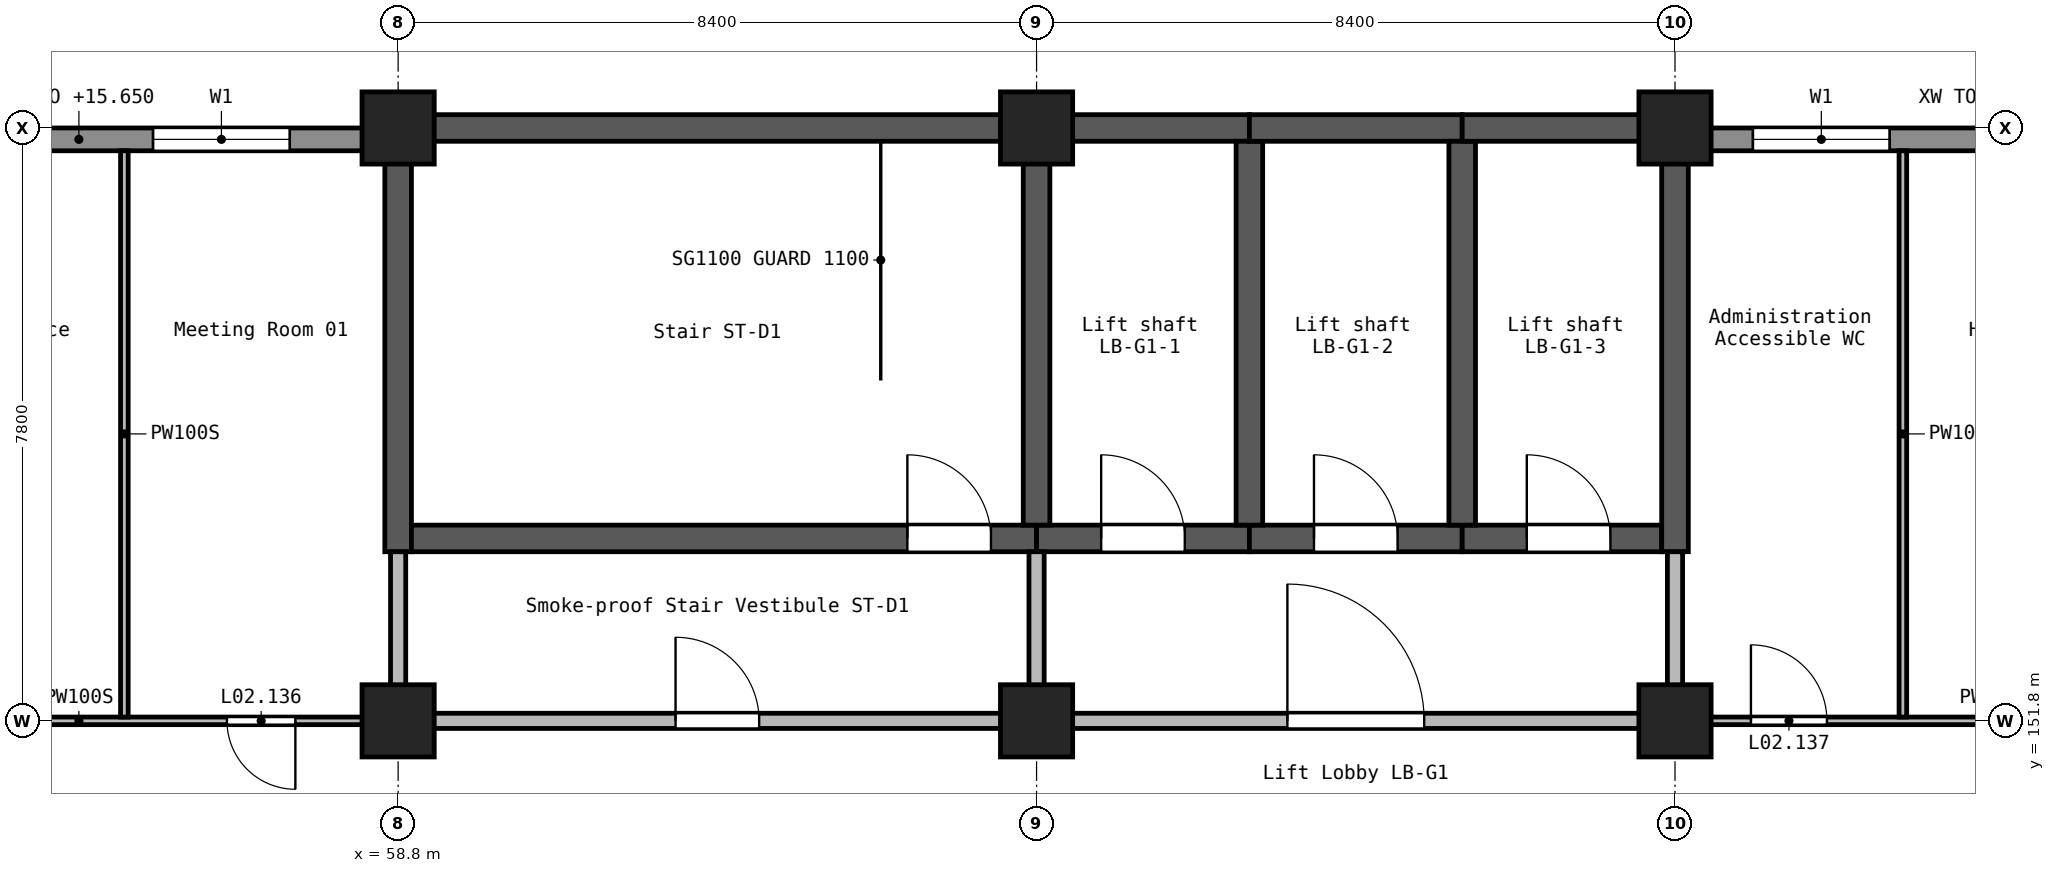
"""IFC4 building model, lengths in metres.
Left out: names, types, materials, properties, quantities, classifications, styles, units other than length and angle.
Written with IfcOpenShell. Run it as: python <this file> out.ifc"""

import sys

from ifc_helpers import new_model, si_unit, direction, frame, frame_2d, origin, origin_2d, place, context, subcontext, project, spatial, rectangle, extrude, element, fill, save


model = new_model("IFC4")
c1 = context("Model", 3, precision=1e-05, world=origin(), true_north=direction((0.0, 1.0)))
c2 = subcontext(c1, "Body", "Model", "MODEL_VIEW")
j1 = project(units=[si_unit("LENGTHUNIT", "METRE"), si_unit("PLANEANGLEUNIT", "RADIAN")], contexts=[c1])
p1 = place(None, origin())
s1 = spatial("IfcSite", under=j1, at=p1, CompositionType="ELEMENT")
p2 = place(p1, origin())
s2 = spatial("IfcBuilding", under=s1, at=p2, CompositionType="ELEMENT")
p3 = place(p2, frame((0.0, 0.0, 12.6)))
s3 = spatial("IfcBuildingStorey", under=s2, at=p3, CompositionType="ELEMENT", Elevation=12.6)
for number, where, z_axis, x_axis in (
    (1, (58.8, 151.8, 0.0), (0.0, 0.0, 1.0), (1.0, 0.0, 0.0)),
    (2, (58.8, 159.6, 0.0), (0.0, 0.0, 1.0), (1.0, 0.0, 0.0)),
    (3, (67.2, 151.8, 0.0), (0.0, 0.0, 1.0), (1.0, 0.0, 0.0)),
    (4, (67.2, 159.6, 0.0), (0.0, 0.0, 1.0), (1.0, 0.0, 0.0)),
    (5, (75.6, 151.8, 0.0), (0.0, 0.0, 1.0), (1.0, 0.0, 0.0)),
    (6, (75.6, 159.6, 0.0), (0.0, 0.0, 1.0), (1.0, 0.0, 0.0)),
):
    element("IfcColumn", number, at=place(p3, frame(where, z_axis=z_axis, x_axis=x_axis)), inside=s3, PredefinedType="COLUMN", context=c2, shape_type="SweptSolid", body=[
        extrude(rectangle(XDim=0.95, YDim=0.95, at=origin_2d()), origin(), (0.0, 0.0, 1.0), 4.2),
    ])
p4 = place(p3, frame((58.625, 159.6, 0.0), z_axis=(0.0, 0.0, 1.0), x_axis=(1.0, 0.0, 0.0)))
e7 = element("IfcWall", 7, at=p4, inside=s3, PredefinedType="SHEAR", context=c2, shape_type="SweptSolid", body=[
    extrude(rectangle(XDim=8.575, YDim=0.35, at=frame_2d((4.288, 0.0))), origin(), (0.0, 0.0, 1.0), 4.2),
])
p5 = place(p3, frame((58.8, 154.025, 0.0), z_axis=(0.0, 0.0, 1.0), x_axis=(0.0, 1.0, 0.0)))
e8 = element("IfcWall", 8, at=p5, inside=s3, PredefinedType="SHEAR", context=c2, shape_type="SweptSolid", body=[
    extrude(rectangle(XDim=5.4, YDim=0.35, at=frame_2d((2.7, 0.0))), origin(), (0.0, 0.0, 1.0), 4.2),
])
p6 = place(p3, frame((58.975, 154.2, 0.0), z_axis=(0.0, 0.0, 1.0), x_axis=(1.0, 0.0, 0.0)))
e9 = element("IfcWall", 9, at=p6, inside=s3, PredefinedType="SHEAR", context=c2, shape_type="SweptSolid", body=[
    extrude(rectangle(XDim=8.225, YDim=0.35, at=frame_2d((4.112, 0.0))), origin(), (0.0, 0.0, 1.0), 4.2),
])
p7 = place(p6, frame((6.525, 0.0, 0.0)))
e10 = element("IfcOpeningElement", 10, at=p7, cuts=e9, PredefinedType="OPENING", context=c2, shape_type="SweptSolid", body=[
    extrude(rectangle(XDim=1.1, YDim=2.1, at=frame_2d((0.55, 1.05))), frame((0.0, 0.185, 0.0), z_axis=(0.0, -1.0, 0.0), x_axis=(1.0, 0.0, 0.0)), (0.0, 0.0, 1.0), 0.37),
])
p8 = place(p3, frame((67.2, 154.2, 0.0), z_axis=(0.0, 0.0, 1.0), x_axis=(1.0, 0.0, 0.0)))
e11 = element("IfcWall", 11, at=p8, inside=s3, PredefinedType="SHEAR", context=c2, shape_type="SweptSolid", body=[
    extrude(rectangle(XDim=2.8, YDim=0.35, at=frame_2d((1.4, 0.0))), origin(), (0.0, 0.0, 1.0), 4.2),
])
p9 = place(p8, frame((0.85, 0.0, 0.0)))
e12 = element("IfcOpeningElement", 12, at=p9, cuts=e11, PredefinedType="OPENING", context=c2, shape_type="SweptSolid", body=[
    extrude(rectangle(XDim=1.1, YDim=2.1, at=frame_2d((0.55, 1.05))), frame((0.0, 0.185, 0.0), z_axis=(0.0, -1.0, 0.0), x_axis=(1.0, 0.0, 0.0)), (0.0, 0.0, 1.0), 0.37),
])
p10 = place(p3, frame((67.2, 154.375, 0.0), z_axis=(0.0, 0.0, 1.0), x_axis=(0.0, 1.0, 0.0)))
e13 = element("IfcWall", 13, at=p10, inside=s3, PredefinedType="SHEAR", context=c2, shape_type="SweptSolid", body=[
    extrude(rectangle(XDim=5.05, YDim=0.35, at=frame_2d((2.525, 0.0))), origin(), (0.0, 0.0, 1.0), 4.2),
])
p11 = place(p3, frame((67.2, 159.6, 0.0), z_axis=(0.0, 0.0, 1.0), x_axis=(1.0, 0.0, 0.0)))
e14 = element("IfcWall", 14, at=p11, inside=s3, PredefinedType="SHEAR", context=c2, shape_type="SweptSolid", body=[
    extrude(rectangle(XDim=2.8, YDim=0.35, at=frame_2d((1.4, 0.0))), origin(), (0.0, 0.0, 1.0), 4.2),
])
p12 = place(p3, frame((70.0, 154.2, 0.0), z_axis=(0.0, 0.0, 1.0), x_axis=(1.0, 0.0, 0.0)))
e15 = element("IfcWall", 15, at=p12, inside=s3, PredefinedType="SHEAR", context=c2, shape_type="SweptSolid", body=[
    extrude(rectangle(XDim=2.8, YDim=0.35, at=frame_2d((1.4, 0.0))), origin(), (0.0, 0.0, 1.0), 4.2),
])
p13 = place(p12, frame((0.85, 0.0, 0.0)))
e16 = element("IfcOpeningElement", 16, at=p13, cuts=e15, PredefinedType="OPENING", context=c2, shape_type="SweptSolid", body=[
    extrude(rectangle(XDim=1.1, YDim=2.1, at=frame_2d((0.55, 1.05))), frame((0.0, 0.185, 0.0), z_axis=(0.0, -1.0, 0.0), x_axis=(1.0, 0.0, 0.0)), (0.0, 0.0, 1.0), 0.37),
])
p14 = place(p3, frame((70.0, 154.375, 0.0), z_axis=(0.0, 0.0, 1.0), x_axis=(0.0, 1.0, 0.0)))
e17 = element("IfcWall", 17, at=p14, inside=s3, PredefinedType="SHEAR", context=c2, shape_type="SweptSolid", body=[
    extrude(rectangle(XDim=5.05, YDim=0.35, at=frame_2d((2.525, 0.0))), origin(), (0.0, 0.0, 1.0), 4.2),
])
p15 = place(p3, frame((70.0, 159.6, 0.0), z_axis=(0.0, 0.0, 1.0), x_axis=(1.0, 0.0, 0.0)))
e18 = element("IfcWall", 18, at=p15, inside=s3, PredefinedType="SHEAR", context=c2, shape_type="SweptSolid", body=[
    extrude(rectangle(XDim=2.8, YDim=0.35, at=frame_2d((1.4, 0.0))), origin(), (0.0, 0.0, 1.0), 4.2),
])
p16 = place(p3, frame((72.8, 154.2, 0.0), z_axis=(0.0, 0.0, 1.0), x_axis=(1.0, 0.0, 0.0)))
e19 = element("IfcWall", 19, at=p16, inside=s3, PredefinedType="SHEAR", context=c2, shape_type="SweptSolid", body=[
    extrude(rectangle(XDim=2.625, YDim=0.35, at=frame_2d((1.312, 0.0))), origin(), (0.0, 0.0, 1.0), 4.2),
])
p17 = place(p16, frame((0.85, 0.0, 0.0)))
e20 = element("IfcOpeningElement", 20, at=p17, cuts=e19, PredefinedType="OPENING", context=c2, shape_type="SweptSolid", body=[
    extrude(rectangle(XDim=1.1, YDim=2.1, at=frame_2d((0.55, 1.05))), frame((0.0, 0.185, 0.0), z_axis=(0.0, -1.0, 0.0), x_axis=(1.0, 0.0, 0.0)), (0.0, 0.0, 1.0), 0.37),
])
p18 = place(p3, frame((72.8, 154.375, 0.0), z_axis=(0.0, 0.0, 1.0), x_axis=(0.0, 1.0, 0.0)))
e21 = element("IfcWall", 21, at=p18, inside=s3, PredefinedType="SHEAR", context=c2, shape_type="SweptSolid", body=[
    extrude(rectangle(XDim=5.05, YDim=0.35, at=frame_2d((2.525, 0.0))), origin(), (0.0, 0.0, 1.0), 4.2),
])
p19 = place(p3, frame((72.8, 159.6, 0.0), z_axis=(0.0, 0.0, 1.0), x_axis=(1.0, 0.0, 0.0)))
e22 = element("IfcWall", 22, at=p19, inside=s3, PredefinedType="SHEAR", context=c2, shape_type="SweptSolid", body=[
    extrude(rectangle(XDim=2.625, YDim=0.35, at=frame_2d((1.312, 0.0))), origin(), (0.0, 0.0, 1.0), 4.2),
])
p20 = place(p3, frame((75.6, 154.025, 0.0), z_axis=(0.0, 0.0, 1.0), x_axis=(0.0, 1.0, 0.0)))
e23 = element("IfcWall", 23, at=p20, inside=s3, PredefinedType="SHEAR", context=c2, shape_type="SweptSolid", body=[
    extrude(rectangle(XDim=5.75, YDim=0.35, at=frame_2d((2.875, 0.0))), origin(), (0.0, 0.0, 1.0), 4.2),
])
p21 = place(p3, frame((83.55, 159.45, 0.0), z_axis=(0.0, 0.0, 1.0), x_axis=(-1.0, 0.0, 0.0)))
e24 = element("IfcWall", 24, at=p21, inside=s3, PredefinedType="STANDARD", context=c2, shape_type="SweptSolid", body=[
    extrude(rectangle(XDim=7.5, YDim=0.3, at=frame_2d((3.75, 0.0))), origin(), (0.0, 0.0, 1.0), 3.05),
])
p22 = place(p21, frame((0.975, 0.0, 0.9)))
e25 = element("IfcOpeningElement", 25, at=p22, cuts=e24, PredefinedType="OPENING", context=c2, shape_type="SweptSolid", body=[
    extrude(rectangle(XDim=1.8, YDim=1.5, at=frame_2d((0.9, 0.75))), frame((0.0, 0.16, 0.0), z_axis=(0.0, -1.0, 0.0), x_axis=(1.0, 0.0, 0.0)), (0.0, 0.0, 1.0), 0.32),
])
p23 = place(p21, frame((5.125, 0.0, 0.9)))
e26 = element("IfcOpeningElement", 26, at=p23, cuts=e24, PredefinedType="OPENING", context=c2, shape_type="SweptSolid", body=[
    extrude(rectangle(XDim=1.8, YDim=1.5, at=frame_2d((0.9, 0.75))), frame((0.0, 0.16, 0.0), z_axis=(0.0, -1.0, 0.0), x_axis=(1.0, 0.0, 0.0)), (0.0, 0.0, 1.0), 0.32),
])
p24 = place(p3, frame((58.35, 159.45, 0.0), z_axis=(0.0, 0.0, 1.0), x_axis=(-1.0, 0.0, 0.0)))
e27 = element("IfcWall", 27, at=p24, inside=s3, PredefinedType="STANDARD", context=c2, shape_type="SweptSolid", body=[
    extrude(rectangle(XDim=7.5, YDim=0.3, at=frame_2d((3.75, 0.0))), origin(), (0.0, 0.0, 1.0), 3.05),
])
p25 = place(p24, frame((0.975, 0.0, 0.9)))
e28 = element("IfcOpeningElement", 28, at=p25, cuts=e27, PredefinedType="OPENING", context=c2, shape_type="SweptSolid", body=[
    extrude(rectangle(XDim=1.8, YDim=1.5, at=frame_2d((0.9, 0.75))), frame((0.0, 0.16, 0.0), z_axis=(0.0, -1.0, 0.0), x_axis=(1.0, 0.0, 0.0)), (0.0, 0.0, 1.0), 0.32),
])
p26 = place(p24, frame((4.725, 0.0, 0.9)))
e29 = element("IfcOpeningElement", 29, at=p26, cuts=e27, PredefinedType="OPENING", context=c2, shape_type="SweptSolid", body=[
    extrude(rectangle(XDim=1.8, YDim=1.5, at=frame_2d((0.9, 0.75))), frame((0.0, 0.16, 0.0), z_axis=(0.0, -1.0, 0.0), x_axis=(1.0, 0.0, 0.0)), (0.0, 0.0, 1.0), 0.32),
])
p27 = place(p3, frame((59.25, 151.8, 0.0), z_axis=(0.0, 0.0, 1.0), x_axis=(1.0, 0.0, 0.0)))
e30 = element("IfcWall", 30, at=p27, inside=s3, PredefinedType="SOLIDWALL", context=c2, shape_type="SweptSolid", body=[
    extrude(rectangle(XDim=7.5, YDim=0.2, at=frame_2d((3.75, 0.0))), origin(), (0.0, 0.0, 1.0), 3.85),
])
p28 = place(p27, frame((3.2, 0.0, 0.0)))
e31 = element("IfcOpeningElement", 31, at=p28, cuts=e30, PredefinedType="OPENING", context=c2, shape_type="SweptSolid", body=[
    extrude(rectangle(XDim=1.1, YDim=2.1, at=frame_2d((0.55, 1.05))), frame((0.0, 0.11, 0.0), z_axis=(0.0, -1.0, 0.0), x_axis=(1.0, 0.0, 0.0)), (0.0, 0.0, 1.0), 0.22),
])
p29 = place(p3, frame((67.65, 151.8, 0.0), z_axis=(0.0, 0.0, 1.0), x_axis=(1.0, 0.0, 0.0)))
e32 = element("IfcWall", 32, at=p29, inside=s3, PredefinedType="SOLIDWALL", context=c2, shape_type="SweptSolid", body=[
    extrude(rectangle(XDim=7.5, YDim=0.2, at=frame_2d((3.75, 0.0))), origin(), (0.0, 0.0, 1.0), 3.85),
])
p30 = place(p29, frame((2.85, 0.0, 0.0)))
e33 = element("IfcOpeningElement", 33, at=p30, cuts=e32, PredefinedType="OPENING", context=c2, shape_type="SweptSolid", body=[
    extrude(rectangle(XDim=1.8, YDim=2.1, at=frame_2d((0.9, 1.05))), frame((0.0, 0.11, 0.0), z_axis=(0.0, -1.0, 0.0), x_axis=(1.0, 0.0, 0.0)), (0.0, 0.0, 1.0), 0.22),
])
for number, where, z_axis, x_axis in (
    (34, (58.8, 152.25, 0.0), (0.0, 0.0, 1.0), (0.0, 1.0, 0.0)),
    (35, (67.2, 152.25, 0.0), (0.0, 0.0, 1.0), (0.0, 1.0, 0.0)),
    (36, (75.6, 152.25, 0.0), (0.0, 0.0, 1.0), (0.0, 1.0, 0.0)),
):
    element("IfcWall", number, at=place(p3, frame(where, z_axis=z_axis, x_axis=x_axis)), inside=s3, PredefinedType="SOLIDWALL", context=c2, shape_type="SweptSolid", body=[
        extrude(rectangle(XDim=1.775, YDim=0.2, at=frame_2d((0.887, 0.0))), origin(), (0.0, 0.0, 1.0), 3.85),
    ])
p31 = place(p3, frame((76.05, 151.8, 0.0), z_axis=(0.0, 0.0, 1.0), x_axis=(1.0, 0.0, 0.0)))
e37 = element("IfcWall", 37, at=p31, inside=s3, PredefinedType="PARTITIONING", context=c2, shape_type="SweptSolid", body=[
    extrude(rectangle(XDim=7.5, YDim=0.1, at=frame_2d((3.75, 0.0))), origin(), (0.0, 0.0, 1.0), 3.85),
])
p32 = place(p31, frame((0.549, 0.0, 0.0)))
e38 = element("IfcOpeningElement", 38, at=p32, cuts=e37, PredefinedType="OPENING", context=c2, shape_type="SweptSolid", body=[
    extrude(rectangle(XDim=1.0, YDim=2.1, at=frame_2d((0.5, 1.05))), frame((0.0, 0.06, 0.0), z_axis=(0.0, -1.0, 0.0), x_axis=(1.0, 0.0, 0.0)), (0.0, 0.0, 1.0), 0.12),
])
p33 = place(p31, frame((4.799, 0.0, 0.0)))
e39 = element("IfcOpeningElement", 39, at=p33, cuts=e37, PredefinedType="OPENING", context=c2, shape_type="SweptSolid", body=[
    extrude(rectangle(XDim=0.9, YDim=2.1, at=frame_2d((0.45, 1.05))), frame((0.0, 0.06, 0.0), z_axis=(0.0, -1.0, 0.0), x_axis=(1.0, 0.0, 0.0)), (0.0, 0.0, 1.0), 0.12),
])
p34 = place(p3, frame((58.35, 151.8, 0.0), z_axis=(0.0, 0.0, 1.0), x_axis=(-1.0, 0.0, 0.0)))
e40 = element("IfcWall", 40, at=p34, inside=s3, PredefinedType="PARTITIONING", context=c2, shape_type="SweptSolid", body=[
    extrude(rectangle(XDim=7.5, YDim=0.1, at=frame_2d((3.75, 0.0))), origin(), (0.0, 0.0, 1.0), 3.85),
])
p35 = place(p34, frame((5.101, 0.0, 0.0)))
e41 = element("IfcOpeningElement", 41, at=p35, cuts=e40, PredefinedType="OPENING", context=c2, shape_type="SweptSolid", body=[
    extrude(rectangle(XDim=0.9, YDim=2.1, at=frame_2d((0.45, 1.05))), frame((0.0, 0.06, 0.0), z_axis=(0.0, -1.0, 0.0), x_axis=(1.0, 0.0, 0.0)), (0.0, 0.0, 1.0), 0.12),
])
p36 = place(p34, frame((0.902, 0.0, 0.0)))
e42 = element("IfcOpeningElement", 42, at=p36, cuts=e40, PredefinedType="OPENING", context=c2, shape_type="SweptSolid", body=[
    extrude(rectangle(XDim=0.9, YDim=2.1, at=frame_2d((0.45, 1.05))), frame((0.0, 0.06, 0.0), z_axis=(0.0, -1.0, 0.0), x_axis=(1.0, 0.0, 0.0)), (0.0, 0.0, 1.0), 0.12),
])
for number, where, z_axis, x_axis in (
    (43, (55.198, 151.85, 0.0), (0.0, 0.0, 1.0), (0.0, 1.0, 0.0)),
    (44, (78.598, 151.85, 0.0), (0.0, 0.0, 1.0), (0.0, 1.0, 0.0)),
):
    element("IfcWall", number, at=place(p3, frame(where, z_axis=z_axis, x_axis=x_axis)), inside=s3, PredefinedType="PARTITIONING", context=c2, shape_type="SweptSolid", body=[
        extrude(rectangle(XDim=7.45, YDim=0.1, at=frame_2d((3.725, 0.0))), origin(), (0.0, 0.0, 1.0), 3.85),
    ])
p37 = place(p23, origin())
e45 = element("IfcWindow", 45, at=p37, inside=s3, PartitioningType="SINGLE_PANEL", PredefinedType="WINDOW", context=c2, shape_type="SweptSolid", body=[
    extrude(rectangle(XDim=1.8, YDim=1.5, at=frame_2d((0.9, 0.75))), frame((0.0, 0.03, 0.0), z_axis=(0.0, -1.0, 0.0), x_axis=(1.0, 0.0, 0.0)), (0.0, 0.0, 1.0), 0.06),
])
fill(e26, e45)
p38 = place(p25, origin())
e46 = element("IfcWindow", 46, at=p38, inside=s3, PartitioningType="SINGLE_PANEL", PredefinedType="WINDOW", context=c2, shape_type="SweptSolid", body=[
    extrude(rectangle(XDim=1.8, YDim=1.5, at=frame_2d((0.9, 0.75))), frame((0.0, 0.03, 0.0), z_axis=(0.0, -1.0, 0.0), x_axis=(1.0, 0.0, 0.0)), (0.0, 0.0, 1.0), 0.06),
])
fill(e28, e46)
p39 = place(p9, origin())
e47 = element("IfcDoor", 47, at=p39, inside=s3, OperationType="DOUBLE_DOOR_SLIDING", PredefinedType="DOOR", context=c2, shape_type="SweptSolid", body=[
    extrude(rectangle(XDim=1.1, YDim=2.1, at=frame_2d((0.55, 1.05))), frame((0.0, 0.025, 0.0), z_axis=(0.0, -1.0, 0.0), x_axis=(1.0, 0.0, 0.0)), (0.0, 0.0, 1.0), 0.05),
])
fill(e12, e47)
p40 = place(p13, origin())
e48 = element("IfcDoor", 48, at=p40, inside=s3, OperationType="DOUBLE_DOOR_SLIDING", PredefinedType="DOOR", context=c2, shape_type="SweptSolid", body=[
    extrude(rectangle(XDim=1.1, YDim=2.1, at=frame_2d((0.55, 1.05))), frame((0.0, 0.025, 0.0), z_axis=(0.0, -1.0, 0.0), x_axis=(1.0, 0.0, 0.0)), (0.0, 0.0, 1.0), 0.05),
])
fill(e16, e48)
p41 = place(p17, origin())
e49 = element("IfcDoor", 49, at=p41, inside=s3, OperationType="DOUBLE_DOOR_SLIDING", PredefinedType="DOOR", context=c2, shape_type="SweptSolid", body=[
    extrude(rectangle(XDim=1.1, YDim=2.1, at=frame_2d((0.55, 1.05))), frame((0.0, 0.025, 0.0), z_axis=(0.0, -1.0, 0.0), x_axis=(1.0, 0.0, 0.0)), (0.0, 0.0, 1.0), 0.05),
])
fill(e20, e49)
p42 = place(p7, origin())
e50 = element("IfcDoor", 50, at=p42, inside=s3, OperationType="SINGLE_SWING_RIGHT", PredefinedType="DOOR", context=c2, shape_type="SweptSolid", body=[
    extrude(rectangle(XDim=1.1, YDim=2.1, at=frame_2d((0.55, 1.05))), frame((0.0, 0.025, 0.0), z_axis=(0.0, -1.0, 0.0), x_axis=(1.0, 0.0, 0.0)), (0.0, 0.0, 1.0), 0.05),
])
fill(e10, e50)
p43 = place(p28, origin())
e51 = element("IfcDoor", 51, at=p43, inside=s3, OperationType="SINGLE_SWING_RIGHT", PredefinedType="DOOR", context=c2, shape_type="SweptSolid", body=[
    extrude(rectangle(XDim=1.1, YDim=2.1, at=frame_2d((0.55, 1.05))), frame((0.0, 0.025, 0.0), z_axis=(0.0, -1.0, 0.0), x_axis=(1.0, 0.0, 0.0)), (0.0, 0.0, 1.0), 0.05),
])
fill(e31, e51)
p44 = place(p30, origin())
e52 = element("IfcDoor", 52, at=p44, inside=s3, OperationType="DOUBLE_DOOR_SINGLE_SWING", PredefinedType="DOOR", context=c2, shape_type="SweptSolid", body=[
    extrude(rectangle(XDim=1.8, YDim=2.1, at=frame_2d((0.9, 1.05))), frame((0.0, 0.025, 0.0), z_axis=(0.0, -1.0, 0.0), x_axis=(1.0, 0.0, 0.0)), (0.0, 0.0, 1.0), 0.05),
])
fill(e33, e52)
p45 = place(p36, frame((0.9, 0.0, 0.0), z_axis=(0.0, 0.0, 1.0), x_axis=(-1.0, 0.0, 0.0)))
e53 = element("IfcDoor", 53, at=p45, inside=s3, OperationType="SINGLE_SWING_RIGHT", PredefinedType="DOOR", context=c2, shape_type="SweptSolid", body=[
    extrude(rectangle(XDim=0.9, YDim=2.1, at=frame_2d((0.45, 1.05))), frame((0.0, 0.025, 0.0), z_axis=(0.0, -1.0, 0.0), x_axis=(1.0, 0.0, 0.0)), (0.0, 0.0, 1.0), 0.05),
])
fill(e42, e53)
p46 = place(p32, origin())
e54 = element("IfcDoor", 54, at=p46, inside=s3, OperationType="SINGLE_SWING_LEFT", PredefinedType="DOOR", context=c2, shape_type="SweptSolid", body=[
    extrude(rectangle(XDim=1.0, YDim=2.1, at=frame_2d((0.5, 1.05))), frame((0.0, 0.025, 0.0), z_axis=(0.0, -1.0, 0.0), x_axis=(1.0, 0.0, 0.0)), (0.0, 0.0, 1.0), 0.05),
])
fill(e38, e54)
save(model, sys.argv[1])
